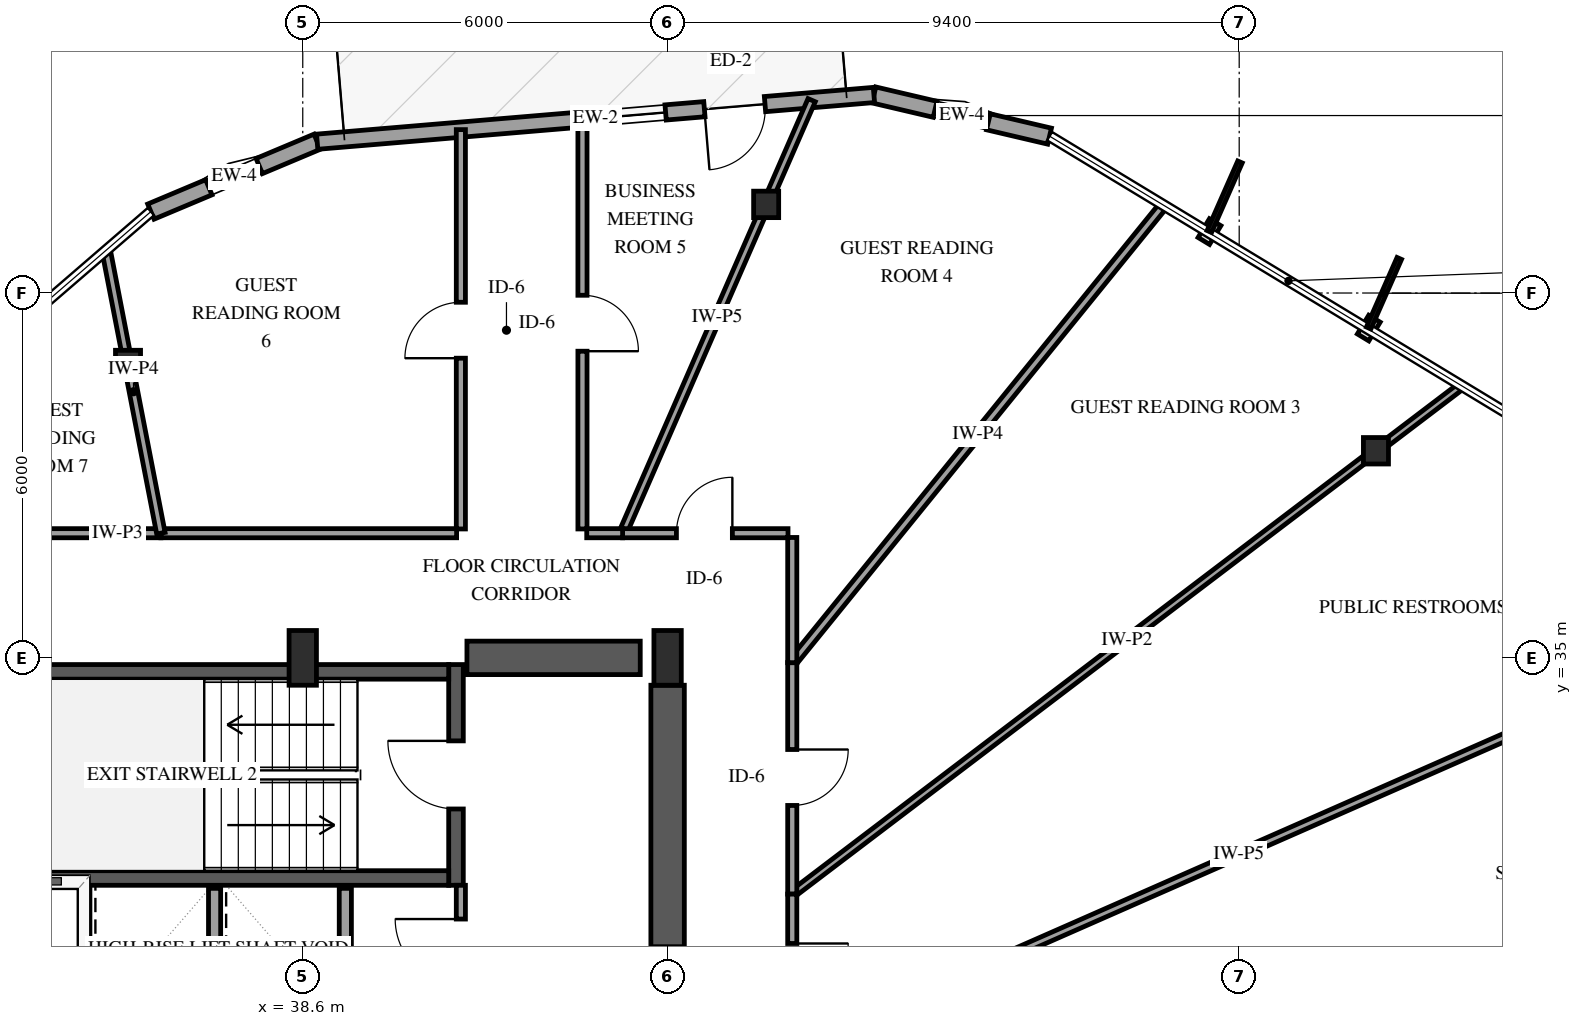
"""IFC4 building model, lengths in metres.
Left out: names, types, materials, properties, quantities, classifications, styles, units other than length and angle.
Written with IfcOpenShell. Run it as: python <this file> out.ifc"""

import sys

from ifc_helpers import new_model, si_unit, direction, frame, frame_2d, origin, origin_2d, place, context, subcontext, project, spatial, rectangle, i_section, extrude, element, fill, save


model = new_model("IFC4")
c1 = context("Model", 3, precision=1e-05, world=origin(), true_north=direction((0.0, 1.0)))
c2 = subcontext(c1, "Body", "Model", "MODEL_VIEW")
j1 = project(units=[si_unit("LENGTHUNIT", "METRE"), si_unit("PLANEANGLEUNIT", "RADIAN")], contexts=[c1])
p1 = place(None, origin())
s1 = spatial("IfcSite", under=j1, at=p1, CompositionType="ELEMENT")
p2 = place(p1, origin())
s2 = spatial("IfcBuilding", under=s1, at=p2, CompositionType="ELEMENT")
p3 = place(p2, frame((0.0, 0.0, 182.2)))
s3 = spatial("IfcBuildingStorey", under=s2, at=p3, CompositionType="ELEMENT", Elevation=182.2)
p4 = place(p3, frame((41.12, 31.26, 0.0), z_axis=(0.0, 0.0, 1.0), x_axis=(0.0, 1.0, 0.0)))
e1 = element("IfcWall", 1, at=p4, inside=s3, PredefinedType="SHEAR", context=c2, shape_type="SweptSolid", body=[
    extrude(rectangle(XDim=3.63, YDim=0.24, at=frame_2d((1.815, 0.0))), origin(), (0.0, 0.0, 1.0), 3.6),
])
p5 = place(p4, frame((1.255, 0.0, 0.0)))
e2 = element("IfcOpeningElement", 2, at=p5, cuts=e1, PredefinedType="OPENING", context=c2, shape_type="SweptSolid", body=[
    extrude(rectangle(XDim=1.12, YDim=2.15, at=frame_2d((0.56, 1.075))), frame((0.0, 0.13, 0.0), z_axis=(0.0, -1.0, 0.0), x_axis=(1.0, 0.0, 0.0)), (0.0, 0.0, 1.0), 0.26),
])
for number, where, z_axis, x_axis in (
    (3, (33.0, 31.38, 0.0), (0.0, 0.0, 1.0), (1.0, 0.0, 0.0)),
    (4, (33.0, 34.77, 0.0), (0.0, 0.0, 1.0), (1.0, 0.0, 0.0)),
):
    element("IfcWall", number, at=place(p3, frame(where, z_axis=z_axis, x_axis=x_axis)), inside=s3, PredefinedType="SHEAR", context=c2, shape_type="SweptSolid", body=[
        extrude(rectangle(XDim=8.0, YDim=0.24, at=frame_2d((4.0, 0.0))), origin(), (0.0, 0.0, 1.0), 3.6),
    ])
p6 = place(p3, frame((41.3, 35.0, 0.0), z_axis=(0.0, 0.0, 1.0), x_axis=(1.0, 0.0, 0.0)))
e5 = element("IfcWall", 5, at=p6, inside=s3, PredefinedType="SHEAR", context=c2, shape_type="SweptSolid", body=[
    extrude(rectangle(XDim=2.85, YDim=0.55, at=frame_2d((1.425, 0.0))), origin(), (0.0, 0.0, 1.0), 3.6),
])
p7 = place(p3, frame((44.6, 29.8, 0.0), z_axis=(0.0, 0.0, 1.0), x_axis=(0.0, 1.0, 0.0)))
e6 = element("IfcWall", 6, at=p7, inside=s3, PredefinedType="SHEAR", context=c2, shape_type="SweptSolid", body=[
    extrude(rectangle(XDim=4.75, YDim=0.55, at=frame_2d((2.375, 0.0))), origin(), (0.0, 0.0, 1.0), 3.6),
])
for number, where, z_axis, x_axis in (
    (7, (38.6, 35.0, 0.0), (0.0, 0.0, 1.0), (1.0, 0.0, 0.0)),
    (8, (44.6, 35.0, 0.0), (0.0, 0.0, 1.0), (1.0, 0.0, 0.0)),
):
    element("IfcColumn", number, at=place(p3, frame(where, z_axis=z_axis, x_axis=x_axis)), inside=s3, PredefinedType="PILASTER", context=c2, shape_type="SweptSolid", body=[
        extrude(rectangle(XDim=0.45, YDim=0.9, at=origin_2d()), origin(), (0.0, 0.0, 1.0), 3.6),
    ])
for number, where, z_axis, x_axis in (
    (9, (56.249, 38.406, 0.0), (0.0, 0.0, 1.0), (1.0, 0.0, 0.0)),
    (10, (46.221, 42.458, 0.0), (0.0, 0.0, 1.0), (1.0, 0.0, 0.0)),
    (11, (35.726, 39.841, 0.0), (0.0, 0.0, 1.0), (1.0, 0.0, 0.0)),
):
    element("IfcColumn", number, at=place(p3, frame(where, z_axis=z_axis, x_axis=x_axis)), inside=s3, PredefinedType="COLUMN", context=c2, shape_type="SweptSolid", body=[
        extrude(i_section(OverallWidth=0.412, OverallDepth=0.435, WebThickness=0.036, FlangeThickness=0.057, FilletRadius=0.038, at=origin_2d()), origin(), (0.0, 0.0, 1.0), 3.6),
    ])
p8 = place(p3, frame((50.881, 43.58, 0.0), z_axis=(0.0, 0.0, 1.0), x_axis=(-0.973573440302, 0.228374158651, 0.0)))
e12 = element("IfcWall", 12, at=p8, inside=s3, PredefinedType="SOLIDWALL", context=c2, shape_type="SweptSolid", body=[
    extrude(rectangle(XDim=2.967, YDim=0.27, at=frame_2d((1.483, 0.0))), origin(), (0.0, 0.0, 1.0), 2.639),
])
p9 = place(p8, frame((1.033, 0.0, 0.75)))
e13 = element("IfcOpeningElement", 13, at=p9, cuts=e12, PredefinedType="OPENING", context=c2, shape_type="SweptSolid", body=[
    extrude(rectangle(XDim=0.9, YDim=1.5, at=frame_2d((0.45, 0.75))), frame((0.0, 0.145, 0.0), z_axis=(0.0, -1.0, 0.0), x_axis=(1.0, 0.0, 0.0)), (0.0, 0.0, 1.0), 0.29),
])
p10 = place(p3, frame((38.837, 43.488, 0.0), z_axis=(0.0, 0.0, 1.0), x_axis=(-0.921859835558, -0.387523474883, 0.0)))
e14 = element("IfcWall", 14, at=p10, inside=s3, PredefinedType="SOLIDWALL", context=c2, shape_type="SweptSolid", body=[
    extrude(rectangle(XDim=2.967, YDim=0.27, at=frame_2d((1.483, 0.0))), origin(), (0.0, 0.0, 1.0), 2.639),
])
p11 = place(p10, frame((1.033, 0.0, 0.75)))
e15 = element("IfcOpeningElement", 15, at=p11, cuts=e14, PredefinedType="OPENING", context=c2, shape_type="SweptSolid", body=[
    extrude(rectangle(XDim=0.9, YDim=1.5, at=frame_2d((0.45, 0.75))), frame((0.0, 0.145, 0.0), z_axis=(0.0, -1.0, 0.0), x_axis=(1.0, 0.0, 0.0)), (0.0, 0.0, 1.0), 0.29),
])
p12 = place(p3, frame((47.993, 44.257, 0.0), z_axis=(0.0, 0.0, 1.0), x_axis=(-0.996493149332, -0.083674388759, 0.0)))
e16 = element("IfcWall", 16, at=p12, inside=s3, PredefinedType="SOLIDWALL", context=c2, shape_type="SweptSolid", body=[
    extrude(rectangle(XDim=9.188, YDim=0.25, at=frame_2d((4.594, 0.0))), origin(), (0.0, 0.0, 1.0), 2.639),
])
p13 = place(p12, frame((1.798, 0.0, 0.0)))
e17 = element("IfcOpeningElement", 17, at=p13, cuts=e16, PredefinedType="OPENING", context=c2, shape_type="SweptSolid", body=[
    extrude(rectangle(XDim=1.0, YDim=2.15, at=frame_2d((0.5, 1.075))), frame((0.0, 0.135, 0.0), z_axis=(0.0, -1.0, 0.0), x_axis=(1.0, 0.0, 0.0)), (0.0, 0.0, 1.0), 0.27),
])
p14 = place(p12, frame((3.438, 0.0, 0.72)))
e18 = element("IfcOpeningElement", 18, at=p14, cuts=e16, PredefinedType="OPENING", context=c2, shape_type="SweptSolid", body=[
    extrude(rectangle(XDim=0.9, YDim=1.5, at=frame_2d((0.45, 0.75))), frame((0.0, 0.135, 0.0), z_axis=(0.0, -1.0, 0.0), x_axis=(1.0, 0.0, 0.0)), (0.0, 0.0, 1.0), 0.27),
])
for number, where, z_axis, x_axis in (
    (19, (35.0, 29.11, 0.0), (0.0, 0.0, 1.0), (0.0, 1.0, 0.0)),
    (20, (37.15, 29.11, 0.0), (0.0, 0.0, 1.0), (0.0, 1.0, 0.0)),
    (21, (39.3, 29.11, 0.0), (0.0, 0.0, 1.0), (0.0, 1.0, 0.0)),
):
    element("IfcWall", number, at=place(p3, frame(where, z_axis=z_axis, x_axis=x_axis)), inside=s3, PredefinedType="SOLIDWALL", context=c2, shape_type="SweptSolid", body=[
        extrude(rectangle(XDim=2.1, YDim=0.2, at=frame_2d((1.05, 0.0))), origin(), (0.0, 0.0, 1.0), 3.26),
    ])
p15 = place(p3, frame((46.65, 28.541, 0.0), z_axis=(0.0, 0.0, 1.0), x_axis=(0.915378055005, 0.402595350712, 0.0)))
e22 = element("IfcWall", 22, at=p15, inside=s3, PredefinedType="PARTITIONING", context=c2, shape_type="SweptSolid", body=[
    extrude(rectangle(XDim=16.048, YDim=0.13, at=frame_2d((8.024, 0.0))), origin(), (0.0, 0.0, 1.0), 3.26),
])
p16 = place(p3, frame((46.65, 31.115, 0.0), z_axis=(0.0, 0.0, 1.0), x_axis=(0.796337772152, 0.604852174208, 0.0)))
e23 = element("IfcWall", 23, at=p16, inside=s3, PredefinedType="PARTITIONING", context=c2, shape_type="SweptSolid", body=[
    extrude(rectangle(XDim=13.823, YDim=0.12, at=frame_2d((6.912, 0.0))), origin(), (0.0, 0.0, 1.0), 2.638),
])
p17 = place(p3, frame((46.65, 34.921, 0.0), z_axis=(0.0, 0.0, 1.0), x_axis=(0.630069812672, 0.776538493031, 0.0)))
e24 = element("IfcWall", 24, at=p17, inside=s3, PredefinedType="PARTITIONING", context=c2, shape_type="SweptSolid", body=[
    extrude(rectangle(XDim=9.689, YDim=0.14, at=frame_2d((4.845, 0.0))), origin(), (0.0, 0.0, 1.0), 3.26),
])
p18 = place(p3, frame((43.86, 37.05, 0.0), z_axis=(0.0, 0.0, 1.0), x_axis=(0.400118177533, 0.916463553016, 0.0)))
e25 = element("IfcWall", 25, at=p18, inside=s3, PredefinedType="PARTITIONING", context=c2, shape_type="SweptSolid", body=[
    extrude(rectangle(XDim=7.77, YDim=0.13, at=frame_2d((3.885, 0.0))), origin(), (0.0, 0.0, 1.0), 2.555),
])
p19 = place(p3, frame((43.2, 43.855, 0.0), z_axis=(0.0, 0.0, 1.0), x_axis=(0.0, -1.0, 0.0)))
e26 = element("IfcWall", 26, at=p19, inside=s3, PredefinedType="PARTITIONING", context=c2, shape_type="SweptSolid", body=[
    extrude(rectangle(XDim=6.735, YDim=0.15, at=frame_2d((3.367, 0.0))), origin(), (0.0, 0.0, 1.0), 3.26),
])
p20 = place(p19, frame((2.892, 0.0, 0.0)))
e27 = element("IfcOpeningElement", 27, at=p20, cuts=e26, PredefinedType="OPENING", context=c2, shape_type="SweptSolid", body=[
    extrude(rectangle(XDim=0.92, YDim=2.12, at=frame_2d((0.46, 1.06))), frame((0.0, 0.085, 0.0), z_axis=(0.0, -1.0, 0.0), x_axis=(1.0, 0.0, 0.0)), (0.0, 0.0, 1.0), 0.17),
])
p21 = place(p3, frame((41.2, 37.12, 0.0), z_axis=(0.0, 0.0, 1.0), x_axis=(0.0, 1.0, 0.0)))
e28 = element("IfcWall", 28, at=p21, inside=s3, PredefinedType="PARTITIONING", context=c2, shape_type="SweptSolid", body=[
    extrude(rectangle(XDim=6.567, YDim=0.15, at=frame_2d((3.283, 0.0))), origin(), (0.0, 0.0, 1.0), 3.26),
])
p22 = place(p21, frame((2.808, 0.0, 0.0)))
e29 = element("IfcOpeningElement", 29, at=p22, cuts=e28, PredefinedType="OPENING", context=c2, shape_type="SweptSolid", body=[
    extrude(rectangle(XDim=0.92, YDim=2.12, at=frame_2d((0.46, 1.06))), frame((0.0, 0.085, 0.0), z_axis=(0.0, -1.0, 0.0), x_axis=(1.0, 0.0, 0.0)), (0.0, 0.0, 1.0), 0.17),
])
p23 = place(p3, frame((29.976, 37.05, 0.0), z_axis=(0.0, 0.0, 1.0), x_axis=(1.0, 0.0, 0.0)))
e30 = element("IfcWall", 30, at=p23, inside=s3, PredefinedType="PARTITIONING", context=c2, shape_type="SweptSolid", body=[
    extrude(rectangle(XDim=6.291, YDim=0.15, at=frame_2d((3.146, 0.0))), origin(), (0.0, 0.0, 1.0), 3.26),
])
p24 = place(p3, frame((36.267, 37.05, 0.0), z_axis=(0.0, 0.0, 1.0), x_axis=(1.0, 0.0, 0.0)))
e31 = element("IfcWall", 31, at=p24, inside=s3, PredefinedType="PARTITIONING", context=c2, shape_type="SweptSolid", body=[
    extrude(rectangle(XDim=4.863, YDim=0.15, at=frame_2d((2.431, 0.0))), origin(), (0.0, 0.0, 1.0), 3.26),
])
p25 = place(p3, frame((36.267, 37.05, 0.0), z_axis=(0.0, 0.0, 1.0), x_axis=(-0.190138832586, 0.981757212524, 0.0)))
e32 = element("IfcWall", 32, at=p25, inside=s3, PredefinedType="PARTITIONING", context=c2, shape_type="SweptSolid", body=[
    extrude(rectangle(XDim=4.739, YDim=0.14, at=frame_2d((2.37, 0.0))), origin(), (0.0, 0.0, 1.0), 2.555),
])
p26 = place(p3, frame((46.65, 34.921, 0.0), z_axis=(0.0, 0.0, 1.0), x_axis=(0.0, -1.0, 0.0)))
e33 = element("IfcWall", 33, at=p26, inside=s3, PredefinedType="PARTITIONING", context=c2, shape_type="SweptSolid", body=[
    extrude(rectangle(XDim=3.806, YDim=0.15, at=frame_2d((1.903, 0.0))), origin(), (0.0, 0.0, 1.0), 3.26),
])
p27 = place(p26, frame((1.428, 0.0, 0.0)))
e34 = element("IfcOpeningElement", 34, at=p27, cuts=e33, PredefinedType="OPENING", context=c2, shape_type="SweptSolid", body=[
    extrude(rectangle(XDim=0.92, YDim=2.12, at=frame_2d((0.46, 1.06))), frame((0.0, 0.085, 0.0), z_axis=(0.0, -1.0, 0.0), x_axis=(1.0, 0.0, 0.0)), (0.0, 0.0, 1.0), 0.17),
])
p28 = place(p3, frame((43.86, 37.05, 0.0), z_axis=(0.0, 0.0, 1.0), x_axis=(1.0, 0.0, 0.0)))
e35 = element("IfcWall", 35, at=p28, inside=s3, PredefinedType="PARTITIONING", context=c2, shape_type="SweptSolid", body=[
    extrude(rectangle(XDim=2.72, YDim=0.15, at=frame_2d((1.36, 0.0))), origin(), (0.0, 0.0, 1.0), 3.26),
])
p29 = place(p28, frame((0.885, 0.0, 0.0)))
e36 = element("IfcOpeningElement", 36, at=p29, cuts=e35, PredefinedType="OPENING", context=c2, shape_type="SweptSolid", body=[
    extrude(rectangle(XDim=0.92, YDim=2.12, at=frame_2d((0.46, 1.06))), frame((0.0, 0.085, 0.0), z_axis=(0.0, -1.0, 0.0), x_axis=(1.0, 0.0, 0.0)), (0.0, 0.0, 1.0), 0.17),
])
p30 = place(p3, frame((46.65, 31.115, 0.0), z_axis=(0.0, 0.0, 1.0), x_axis=(0.0, -1.0, 0.0)))
e37 = element("IfcWall", 37, at=p30, inside=s3, PredefinedType="PARTITIONING", context=c2, shape_type="SweptSolid", body=[
    extrude(rectangle(XDim=2.574, YDim=0.15, at=frame_2d((1.287, 0.0))), origin(), (0.0, 0.0, 1.0), 3.26),
])
p31 = place(p30, frame((0.812, 0.0, 0.0)))
e38 = element("IfcOpeningElement", 38, at=p31, cuts=e37, PredefinedType="OPENING", context=c2, shape_type="SweptSolid", body=[
    extrude(rectangle(XDim=0.92, YDim=2.12, at=frame_2d((0.46, 1.06))), frame((0.0, 0.085, 0.0), z_axis=(0.0, -1.0, 0.0), x_axis=(1.0, 0.0, 0.0)), (0.0, 0.0, 1.0), 0.17),
])
p32 = place(p3, frame((41.2, 29.07, 0.0), z_axis=(0.0, 0.0, 1.0), x_axis=(0.0, 1.0, 0.0)))
e39 = element("IfcWall", 39, at=p32, inside=s3, PredefinedType="PARTITIONING", context=c2, shape_type="SweptSolid", body=[
    extrude(rectangle(XDim=2.19, YDim=0.15, at=frame_2d((1.095, 0.0))), origin(), (0.0, 0.0, 1.0), 3.26),
])
p33 = place(p32, frame((0.555, 0.0, 0.0)))
e40 = element("IfcOpeningElement", 40, at=p33, cuts=e39, PredefinedType="OPENING", context=c2, shape_type="SweptSolid", body=[
    extrude(rectangle(XDim=1.08, YDim=2.15, at=frame_2d((0.54, 1.075))), frame((0.0, 0.085, 0.0), z_axis=(0.0, -1.0, 0.0), x_axis=(1.0, 0.0, 0.0)), (0.0, 0.0, 1.0), 0.17),
])
p34 = place(p3, frame((46.65, 36.98, 0.0), z_axis=(0.0, 0.0, 1.0), x_axis=(0.0, -1.0, 0.0)))
e41 = element("IfcWall", 41, at=p34, inside=s3, PredefinedType="PARTITIONING", context=c2, shape_type="SweptSolid", body=[
    extrude(rectangle(XDim=2.059, YDim=0.15, at=frame_2d((1.03, 0.0))), origin(), (0.0, 0.0, 1.0), 3.26),
])
p35 = place(p3, frame((43.27, 37.05, 0.0), z_axis=(0.0, 0.0, 1.0), x_axis=(1.0, 0.0, 0.0)))
e42 = element("IfcWall", 42, at=p35, inside=s3, PredefinedType="PARTITIONING", context=c2, shape_type="SweptSolid", body=[
    extrude(rectangle(XDim=0.59, YDim=0.15, at=frame_2d((0.295, 0.0))), origin(), (0.0, 0.0, 1.0), 3.26),
])
p36 = place(p9, origin())
e43 = element("IfcWindow", 43, at=p36, inside=s3, PartitioningType="SINGLE_PANEL", PredefinedType="WINDOW", context=c2, shape_type="SweptSolid", body=[
    extrude(rectangle(XDim=0.9, YDim=1.5, at=frame_2d((0.45, 0.75))), frame((0.0, 0.03, 0.0), z_axis=(0.0, -1.0, 0.0), x_axis=(1.0, 0.0, 0.0)), (0.0, 0.0, 1.0), 0.06),
])
fill(e13, e43)
p37 = place(p11, origin())
e44 = element("IfcWindow", 44, at=p37, inside=s3, PartitioningType="SINGLE_PANEL", PredefinedType="WINDOW", context=c2, shape_type="SweptSolid", body=[
    extrude(rectangle(XDim=0.9, YDim=1.5, at=frame_2d((0.45, 0.75))), frame((0.0, 0.03, 0.0), z_axis=(0.0, -1.0, 0.0), x_axis=(1.0, 0.0, 0.0)), (0.0, 0.0, 1.0), 0.06),
])
fill(e15, e44)
p38 = place(p13, origin())
e45 = element("IfcDoor", 45, at=p38, inside=s3, OperationType="SINGLE_SWING_RIGHT", PredefinedType="DOOR", context=c2, shape_type="SweptSolid", body=[
    extrude(rectangle(XDim=1.0, YDim=2.15, at=frame_2d((0.5, 1.075))), frame((0.0, 0.025, 0.0), z_axis=(0.0, -1.0, 0.0), x_axis=(1.0, 0.0, 0.0)), (0.0, 0.0, 1.0), 0.05),
])
fill(e17, e45)
p39 = place(p14, origin())
e46 = element("IfcWindow", 46, at=p39, inside=s3, PartitioningType="SINGLE_PANEL", PredefinedType="WINDOW", context=c2, shape_type="SweptSolid", body=[
    extrude(rectangle(XDim=0.9, YDim=1.5, at=frame_2d((0.45, 0.75))), frame((0.0, 0.03, 0.0), z_axis=(0.0, -1.0, 0.0), x_axis=(1.0, 0.0, 0.0)), (0.0, 0.0, 1.0), 0.06),
])
fill(e18, e46)
p40 = place(p5, origin())
e47 = element("IfcDoor", 47, at=p40, inside=s3, OperationType="SINGLE_SWING_RIGHT", PredefinedType="DOOR", context=c2, shape_type="SweptSolid", body=[
    extrude(rectangle(XDim=1.12, YDim=2.15, at=frame_2d((0.56, 1.075))), frame((0.0, 0.025, 0.0), z_axis=(0.0, -1.0, 0.0), x_axis=(1.0, 0.0, 0.0)), (0.0, 0.0, 1.0), 0.05),
])
fill(e2, e47)
p41 = place(p20, origin())
e48 = element("IfcDoor", 48, at=p41, inside=s3, OperationType="SINGLE_SWING_RIGHT", PredefinedType="DOOR", context=c2, shape_type="SweptSolid", body=[
    extrude(rectangle(XDim=0.92, YDim=2.12, at=frame_2d((0.46, 1.06))), frame((0.0, 0.025, 0.0), z_axis=(0.0, -1.0, 0.0), x_axis=(1.0, 0.0, 0.0)), (0.0, 0.0, 1.0), 0.05),
])
fill(e27, e48)
p42 = place(p22, origin())
e49 = element("IfcDoor", 49, at=p42, inside=s3, OperationType="SINGLE_SWING_LEFT", PredefinedType="DOOR", context=c2, shape_type="SweptSolid", body=[
    extrude(rectangle(XDim=0.92, YDim=2.12, at=frame_2d((0.46, 1.06))), frame((0.0, 0.025, 0.0), z_axis=(0.0, -1.0, 0.0), x_axis=(1.0, 0.0, 0.0)), (0.0, 0.0, 1.0), 0.05),
])
fill(e29, e49)
p43 = place(p27, origin())
e50 = element("IfcDoor", 50, at=p43, inside=s3, OperationType="SINGLE_SWING_LEFT", PredefinedType="DOOR", context=c2, shape_type="SweptSolid", body=[
    extrude(rectangle(XDim=0.92, YDim=2.12, at=frame_2d((0.46, 1.06))), frame((0.0, 0.025, 0.0), z_axis=(0.0, -1.0, 0.0), x_axis=(1.0, 0.0, 0.0)), (0.0, 0.0, 1.0), 0.05),
])
fill(e34, e50)
p44 = place(p29, origin())
e51 = element("IfcDoor", 51, at=p44, inside=s3, OperationType="SINGLE_SWING_RIGHT", PredefinedType="DOOR", context=c2, shape_type="SweptSolid", body=[
    extrude(rectangle(XDim=0.92, YDim=2.12, at=frame_2d((0.46, 1.06))), frame((0.0, 0.025, 0.0), z_axis=(0.0, -1.0, 0.0), x_axis=(1.0, 0.0, 0.0)), (0.0, 0.0, 1.0), 0.05),
])
fill(e36, e51)
p45 = place(p31, origin())
e52 = element("IfcDoor", 52, at=p45, inside=s3, OperationType="SINGLE_SWING_LEFT", PredefinedType="DOOR", context=c2, shape_type="SweptSolid", body=[
    extrude(rectangle(XDim=0.92, YDim=2.12, at=frame_2d((0.46, 1.06))), frame((0.0, 0.025, 0.0), z_axis=(0.0, -1.0, 0.0), x_axis=(1.0, 0.0, 0.0)), (0.0, 0.0, 1.0), 0.05),
])
fill(e38, e52)
p46 = place(p33, origin())
e53 = element("IfcDoor", 53, at=p46, inside=s3, OperationType="SINGLE_SWING_RIGHT", PredefinedType="DOOR", context=c2, shape_type="SweptSolid", body=[
    extrude(rectangle(XDim=1.08, YDim=2.15, at=frame_2d((0.54, 1.075))), frame((0.0, 0.025, 0.0), z_axis=(0.0, -1.0, 0.0), x_axis=(1.0, 0.0, 0.0)), (0.0, 0.0, 1.0), 0.05),
])
fill(e40, e53)
save(model, sys.argv[1])
